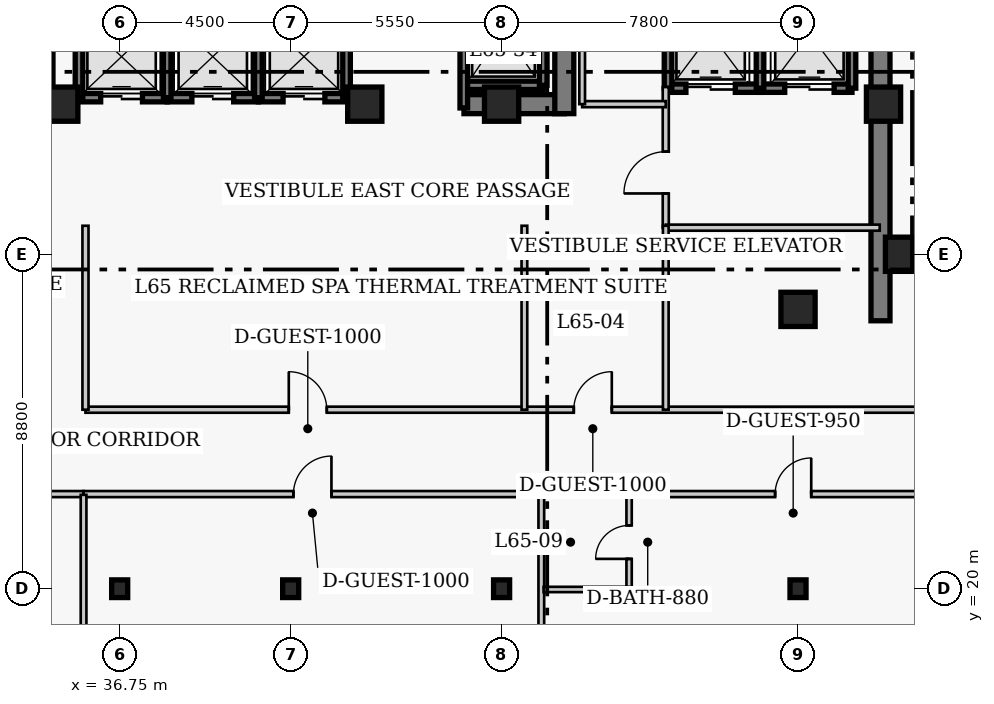
"""IFC4 building model, lengths in metres.
Left out: names, types, materials, properties, quantities, classifications, styles, units other than length and angle.
Written with IfcOpenShell. Run it as: python <this file> out.ifc"""

import sys

from ifc_helpers import new_model, si_unit, direction, frame, frame_2d, origin, origin_2d, place, context, subcontext, project, spatial, rectangle, i_section, extrude, element, fill, save


model = new_model("IFC4")
c1 = context("Model", 3, precision=1e-05, world=origin(), true_north=direction((0.0, 1.0)))
c2 = subcontext(c1, "Body", "Model", "MODEL_VIEW")
j1 = project(units=[si_unit("LENGTHUNIT", "METRE"), si_unit("PLANEANGLEUNIT", "RADIAN")], contexts=[c1])
p1 = place(None, origin())
s1 = spatial("IfcSite", under=j1, at=p1, CompositionType="ELEMENT")
p2 = place(p1, origin())
s2 = spatial("IfcBuilding", under=s1, at=p2, CompositionType="ELEMENT")
p3 = place(p2, frame((0.0, 0.0, 261.4)))
s3 = spatial("IfcBuildingStorey", under=s2, at=p3, CompositionType="ELEMENT", Elevation=261.4)
p4 = place(p3, frame((56.77, 27.05, 0.0), z_axis=(0.0, 0.0, 1.0), x_axis=(0.0, 1.0, 0.0)))
e1 = element("IfcWall", 1, at=p4, inside=s3, PredefinedType="SHEAR", context=c2, shape_type="SweptSolid", body=[
    extrude(rectangle(XDim=13.52, YDim=0.5, at=frame_2d((6.76, 0.0))), origin(), (0.0, 0.0, 1.0), 4.0),
])
p5 = place(p3, frame((45.81, 32.75, 0.0), z_axis=(0.0, 0.0, 1.0), x_axis=(1.0, 0.0, 0.0)))
e2 = element("IfcWall", 2, at=p5, inside=s3, PredefinedType="SHEAR", context=c2, shape_type="SweptSolid", body=[
    extrude(rectangle(XDim=2.64, YDim=0.5, at=frame_2d((1.32, 0.0))), origin(), (0.0, 0.0, 1.0), 4.0),
])
p6 = place(p3, frame((48.45, 32.5, 0.0), z_axis=(0.0, 0.0, 1.0), x_axis=(0.0, 1.0, 0.0)))
e3 = element("IfcWall", 3, at=p6, inside=s3, PredefinedType="SHEAR", context=c2, shape_type="SweptSolid", body=[
    extrude(rectangle(XDim=7.82, YDim=0.5, at=frame_2d((3.91, 0.0))), origin(), (0.0, 0.0, 1.0), 4.0),
])
p7 = place(p6, frame((5.7, 0.0, 0.0)))
e4 = element("IfcOpeningElement", 4, at=p7, cuts=e3, PredefinedType="OPENING", context=c2, shape_type="SweptSolid", body=[
    extrude(rectangle(XDim=1.1, YDim=2.15, at=frame_2d((0.55, 1.075))), frame((0.0, 0.26, 0.0), z_axis=(0.0, -1.0, 0.0), x_axis=(1.0, 0.0, 0.0)), (0.0, 0.0, 1.0), 0.52),
])
for number, where, z_axis, x_axis in (
    (5, (36.75, 20.0, 0.0), (0.0, 0.0, 1.0), (1.0, 0.0, 0.0)),
    (6, (41.25, 20.0, 0.0), (0.0, 0.0, 1.0), (1.0, 0.0, 0.0)),
    (7, (46.8, 20.0, 0.0), (0.0, 0.0, 1.0), (1.0, 0.0, 0.0)),
    (8, (54.6, 20.0, 0.0), (0.0, 0.0, 1.0), (1.0, 0.0, 0.0)),
):
    element("IfcColumn", number, at=place(p3, frame(where, z_axis=z_axis, x_axis=x_axis)), inside=s3, PredefinedType="COLUMN", context=c2, shape_type="SweptSolid", body=[
        extrude(i_section(OverallWidth=0.422, OverallDepth=0.465, WebThickness=0.045, FlangeThickness=0.073, FilletRadius=0.017, at=origin_2d()), origin(), (0.0, 0.0, 1.0), 4.0),
    ])
for number, where, z_axis, x_axis in (
    (9, (57.35, 28.8, 0.0), (0.0, 0.0, 1.0), (1.0, 0.0, 0.0)),
    (10, (35.2, 32.75, 0.0), (0.0, 0.0, 1.0), (1.0, 0.0, 0.0)),
    (11, (43.2, 32.75, 0.0), (0.0, 0.0, 1.0), (1.0, 0.0, 0.0)),
    (12, (46.8, 32.75, 0.0), (0.0, 0.0, 1.0), (1.0, 0.0, 0.0)),
    (13, (54.6, 27.35, 0.0), (0.0, 0.0, 1.0), (1.0, 0.0, 0.0)),
    (14, (56.85, 32.75, 0.0), (0.0, 0.0, 1.0), (1.0, 0.0, 0.0)),
):
    element("IfcColumn", number, at=place(p3, frame(where, z_axis=z_axis, x_axis=x_axis)), inside=s3, PredefinedType="COLUMN", context=c2, shape_type="SweptSolid", body=[
        extrude(rectangle(XDim=0.9, YDim=0.9, at=origin_2d()), origin(), (0.0, 0.0, 1.0), 4.0),
    ])
p8 = place(p3, frame((35.68, 32.92, 0.0), z_axis=(0.0, 0.0, 1.0), x_axis=(1.0, 0.0, 0.0)))
e15 = element("IfcWall", 15, at=p8, inside=s3, PredefinedType="SHEAR", context=c2, shape_type="SweptSolid", body=[
    extrude(rectangle(XDim=2.32, YDim=0.22, at=frame_2d((1.16, 0.0))), origin(), (0.0, 0.0, 1.0), 4.0),
])
p9 = place(p8, frame((0.57, 0.0, 0.0)))
e16 = element("IfcOpeningElement", 16, at=p9, cuts=e15, PredefinedType="OPENING", context=c2, shape_type="SweptSolid", body=[
    extrude(rectangle(XDim=1.1, YDim=2.15, at=frame_2d((0.55, 1.075))), frame((0.0, 0.12, 0.0), z_axis=(0.0, -1.0, 0.0), x_axis=(1.0, 0.0, 0.0)), (0.0, 0.0, 1.0), 0.24),
])
p10 = place(p3, frame((35.68, 32.92, 0.0), z_axis=(0.0, 0.0, 1.0), x_axis=(0.0, 1.0, 0.0)))
e17 = element("IfcWall", 17, at=p10, inside=s3, PredefinedType="SHEAR", context=c2, shape_type="SweptSolid", body=[
    extrude(rectangle(XDim=2.16, YDim=0.2, at=frame_2d((1.08, 0.0))), origin(), (0.0, 0.0, 1.0), 4.0),
])
p11 = place(p3, frame((38.0, 32.92, 0.0), z_axis=(0.0, 0.0, 1.0), x_axis=(1.0, 0.0, 0.0)))
e18 = element("IfcWall", 18, at=p11, inside=s3, PredefinedType="SHEAR", context=c2, shape_type="SweptSolid", body=[
    extrude(rectangle(XDim=2.4, YDim=0.22, at=frame_2d((1.2, 0.0))), origin(), (0.0, 0.0, 1.0), 4.0),
])
p12 = place(p11, frame((0.65, 0.0, 0.0)))
e19 = element("IfcOpeningElement", 19, at=p12, cuts=e18, PredefinedType="OPENING", context=c2, shape_type="SweptSolid", body=[
    extrude(rectangle(XDim=1.1, YDim=2.15, at=frame_2d((0.55, 1.075))), frame((0.0, 0.12, 0.0), z_axis=(0.0, -1.0, 0.0), x_axis=(1.0, 0.0, 0.0)), (0.0, 0.0, 1.0), 0.24),
])
p13 = place(p3, frame((38.0, 32.92, 0.0), z_axis=(0.0, 0.0, 1.0), x_axis=(0.0, 1.0, 0.0)))
e20 = element("IfcWall", 20, at=p13, inside=s3, PredefinedType="SHEAR", context=c2, shape_type="SweptSolid", body=[
    extrude(rectangle(XDim=2.16, YDim=0.2, at=frame_2d((1.08, 0.0))), origin(), (0.0, 0.0, 1.0), 4.0),
])
p14 = place(p3, frame((40.4, 32.92, 0.0), z_axis=(0.0, 0.0, 1.0), x_axis=(1.0, 0.0, 0.0)))
e21 = element("IfcWall", 21, at=p14, inside=s3, PredefinedType="SHEAR", context=c2, shape_type="SweptSolid", body=[
    extrude(rectangle(XDim=2.32, YDim=0.22, at=frame_2d((1.16, 0.0))), origin(), (0.0, 0.0, 1.0), 4.0),
])
p15 = place(p14, frame((0.65, 0.0, 0.0)))
e22 = element("IfcOpeningElement", 22, at=p15, cuts=e21, PredefinedType="OPENING", context=c2, shape_type="SweptSolid", body=[
    extrude(rectangle(XDim=1.1, YDim=2.15, at=frame_2d((0.55, 1.075))), frame((0.0, 0.12, 0.0), z_axis=(0.0, -1.0, 0.0), x_axis=(1.0, 0.0, 0.0)), (0.0, 0.0, 1.0), 0.24),
])
for number, where, z_axis, x_axis in (
    (23, (40.4, 32.92, 0.0), (0.0, 0.0, 1.0), (0.0, 1.0, 0.0)),
    (24, (42.72, 32.92, 0.0), (0.0, 0.0, 1.0), (0.0, 1.0, 0.0)),
):
    element("IfcWall", number, at=place(p3, frame(where, z_axis=z_axis, x_axis=x_axis)), inside=s3, PredefinedType="SHEAR", context=c2, shape_type="SweptSolid", body=[
        extrude(rectangle(XDim=2.16, YDim=0.2, at=frame_2d((1.08, 0.0))), origin(), (0.0, 0.0, 1.0), 4.0),
    ])
p16 = place(p3, frame((51.18, 33.17, 0.0), z_axis=(0.0, 0.0, 1.0), x_axis=(1.0, 0.0, 0.0)))
e25 = element("IfcWall", 25, at=p16, inside=s3, PredefinedType="SHEAR", context=c2, shape_type="SweptSolid", body=[
    extrude(rectangle(XDim=2.42, YDim=0.22, at=frame_2d((1.21, 0.0))), origin(), (0.0, 0.0, 1.0), 4.0),
])
p17 = place(p16, frame((0.47, 0.0, 0.0)))
e26 = element("IfcOpeningElement", 26, at=p17, cuts=e25, PredefinedType="OPENING", context=c2, shape_type="SweptSolid", body=[
    extrude(rectangle(XDim=1.3, YDim=2.15, at=frame_2d((0.65, 1.075))), frame((0.0, 0.12, 0.0), z_axis=(0.0, -1.0, 0.0), x_axis=(1.0, 0.0, 0.0)), (0.0, 0.0, 1.0), 0.24),
])
p18 = place(p3, frame((51.18, 33.17, 0.0), z_axis=(0.0, 0.0, 1.0), x_axis=(0.0, 1.0, 0.0)))
e27 = element("IfcWall", 27, at=p18, inside=s3, PredefinedType="SHEAR", context=c2, shape_type="SweptSolid", body=[
    extrude(rectangle(XDim=2.86, YDim=0.2, at=frame_2d((1.43, 0.0))), origin(), (0.0, 0.0, 1.0), 4.0),
])
p19 = place(p3, frame((53.6, 33.17, 0.0), z_axis=(0.0, 0.0, 1.0), x_axis=(1.0, 0.0, 0.0)))
e28 = element("IfcWall", 28, at=p19, inside=s3, PredefinedType="SHEAR", context=c2, shape_type="SweptSolid", body=[
    extrude(rectangle(XDim=2.42, YDim=0.22, at=frame_2d((1.21, 0.0))), origin(), (0.0, 0.0, 1.0), 4.0),
])
p20 = place(p19, frame((0.65, 0.0, 0.0)))
e29 = element("IfcOpeningElement", 29, at=p20, cuts=e28, PredefinedType="OPENING", context=c2, shape_type="SweptSolid", body=[
    extrude(rectangle(XDim=1.3, YDim=2.15, at=frame_2d((0.65, 1.075))), frame((0.0, 0.12, 0.0), z_axis=(0.0, -1.0, 0.0), x_axis=(1.0, 0.0, 0.0)), (0.0, 0.0, 1.0), 0.24),
])
for number, where, z_axis, x_axis in (
    (30, (53.6, 33.17, 0.0), (0.0, 0.0, 1.0), (0.0, 1.0, 0.0)),
    (31, (56.02, 33.17, 0.0), (0.0, 0.0, 1.0), (0.0, 1.0, 0.0)),
):
    element("IfcWall", number, at=place(p3, frame(where, z_axis=z_axis, x_axis=x_axis)), inside=s3, PredefinedType="SHEAR", context=c2, shape_type="SweptSolid", body=[
        extrude(rectangle(XDim=2.86, YDim=0.2, at=frame_2d((1.43, 0.0))), origin(), (0.0, 0.0, 1.0), 4.0),
    ])
p21 = place(p3, frame((34.895, 33.245, 0.0), z_axis=(0.0, 0.0, 1.0), x_axis=(0.0, 1.0, 0.0)))
e32 = element("IfcWall", 32, at=p21, inside=s3, PredefinedType="SHEAR", context=c2, shape_type="SweptSolid", body=[
    extrude(rectangle(XDim=2.91, YDim=0.2, at=frame_2d((1.455, 0.0))), origin(), (0.0, 0.0, 1.0), 4.0),
])
p22 = place(p3, frame((45.805, 33.245, 0.0), z_axis=(0.0, 0.0, 1.0), x_axis=(1.0, 0.0, 0.0)))
e33 = element("IfcWall", 33, at=p22, inside=s3, PredefinedType="SHEAR", context=c2, shape_type="SweptSolid", body=[
    extrude(rectangle(XDim=2.09, YDim=0.22, at=frame_2d((1.045, 0.0))), origin(), (0.0, 0.0, 1.0), 4.0),
])
p23 = place(p3, frame((45.805, 32.65, 0.0), z_axis=(0.0, 0.0, 1.0), x_axis=(0.0, 1.0, 0.0)))
e34 = element("IfcWall", 34, at=p23, inside=s3, PredefinedType="SHEAR", context=c2, shape_type="SweptSolid", body=[
    extrude(rectangle(XDim=3.505, YDim=0.2, at=frame_2d((1.752, 0.0))), origin(), (0.0, 0.0, 1.0), 4.0),
])
p24 = place(p3, frame((47.895, 33.245, 0.0), z_axis=(0.0, 0.0, 1.0), x_axis=(0.0, 1.0, 0.0)))
e35 = element("IfcWall", 35, at=p24, inside=s3, PredefinedType="SHEAR", context=c2, shape_type="SweptSolid", body=[
    extrude(rectangle(XDim=2.91, YDim=0.2, at=frame_2d((1.455, 0.0))), origin(), (0.0, 0.0, 1.0), 4.0),
])
p25 = place(p3, frame((51.12, 29.5, 0.0), z_axis=(0.0, 0.0, 1.0), x_axis=(0.0, 1.0, 0.0)))
e36 = element("IfcWall", 36, at=p25, inside=s3, PredefinedType="PARTITIONING", context=c2, shape_type="SweptSolid", body=[
    extrude(rectangle(XDim=3.7, YDim=0.16, at=frame_2d((1.85, 0.0))), origin(), (0.0, 0.0, 1.0), 3.76),
])
p26 = place(p25, frame((0.9, 0.0, 0.0)))
e37 = element("IfcOpeningElement", 37, at=p26, cuts=e36, PredefinedType="OPENING", context=c2, shape_type="SweptSolid", body=[
    extrude(rectangle(XDim=1.1, YDim=2.15, at=frame_2d((0.55, 1.075))), frame((0.0, 0.09, 0.0), z_axis=(0.0, -1.0, 0.0), x_axis=(1.0, 0.0, 0.0)), (0.0, 0.0, 1.0), 0.18),
])
p27 = place(p3, frame((51.12, 29.5, 0.0), z_axis=(0.0, 0.0, 1.0), x_axis=(1.0, 0.0, 0.0)))
e38 = element("IfcWall", 38, at=p27, inside=s3, PredefinedType="PARTITIONING", context=c2, shape_type="SweptSolid", body=[
    extrude(rectangle(XDim=5.63, YDim=0.16, at=frame_2d((2.815, 0.0))), origin(), (0.0, 0.0, 1.0), 3.76),
])
p28 = place(p3, frame((48.92, 32.75, 0.0), z_axis=(0.0, 0.0, 1.0), x_axis=(1.0, 0.0, 0.0)))
e39 = element("IfcWall", 39, at=p28, inside=s3, PredefinedType="PARTITIONING", context=c2, shape_type="SweptSolid", body=[
    extrude(rectangle(XDim=2.2, YDim=0.16, at=frame_2d((1.1, 0.0))), origin(), (0.0, 0.0, 1.0), 3.76),
])
p29 = place(p3, frame((48.92, 32.75, 0.0), z_axis=(0.0, 0.0, 1.0), x_axis=(0.0, 1.0, 0.0)))
e40 = element("IfcWall", 40, at=p29, inside=s3, PredefinedType="PARTITIONING", context=c2, shape_type="SweptSolid", body=[
    extrude(rectangle(XDim=3.62, YDim=0.15, at=frame_2d((1.81, 0.0))), origin(), (0.0, 0.0, 1.0), 3.76),
])
p30 = place(p3, frame((35.85, 24.71, 0.0), z_axis=(0.0, 0.0, 1.0), x_axis=(1.0, 0.0, 0.0)))
e41 = element("IfcWall", 41, at=p30, inside=s3, PredefinedType="PARTITIONING", context=c2, shape_type="SweptSolid", body=[
    extrude(rectangle(XDim=23.0, YDim=0.16, at=frame_2d((11.5, 0.0))), origin(), (0.0, 0.0, 1.0), 3.76),
])
p31 = place(p30, frame((5.35, 0.0, 0.0)))
e42 = element("IfcOpeningElement", 42, at=p31, cuts=e41, PredefinedType="OPENING", context=c2, shape_type="SweptSolid", body=[
    extrude(rectangle(XDim=1.0, YDim=2.15, at=frame_2d((0.5, 1.075))), frame((0.0, 0.09, 0.0), z_axis=(0.0, -1.0, 0.0), x_axis=(1.0, 0.0, 0.0)), (0.0, 0.0, 1.0), 0.18),
])
p32 = place(p30, frame((12.85, 0.0, 0.0)))
e43 = element("IfcOpeningElement", 43, at=p32, cuts=e41, PredefinedType="OPENING", context=c2, shape_type="SweptSolid", body=[
    extrude(rectangle(XDim=1.0, YDim=2.15, at=frame_2d((0.5, 1.075))), frame((0.0, 0.09, 0.0), z_axis=(0.0, -1.0, 0.0), x_axis=(1.0, 0.0, 0.0)), (0.0, 0.0, 1.0), 0.18),
])
p33 = place(p3, frame((35.85, 24.71, 0.0), z_axis=(0.0, 0.0, 1.0), x_axis=(0.0, 1.0, 0.0)))
e44 = element("IfcWall", 44, at=p33, inside=s3, PredefinedType="PARTITIONING", context=c2, shape_type="SweptSolid", body=[
    extrude(rectangle(XDim=4.84, YDim=0.16, at=frame_2d((2.42, 0.0))), origin(), (0.0, 0.0, 1.0), 3.76),
])
p34 = place(p3, frame((19.1, 22.49, 0.0), z_axis=(0.0, 0.0, 1.0), x_axis=(1.0, 0.0, 0.0)))
e45 = element("IfcWall", 45, at=p34, inside=s3, PredefinedType="PARTITIONING", context=c2, shape_type="SweptSolid", body=[
    extrude(rectangle(XDim=16.7, YDim=0.16, at=frame_2d((8.35, 0.0))), origin(), (0.0, 0.0, 1.0), 3.76),
])
p35 = place(p34, frame((7.88, 0.0, 0.0)))
e46 = element("IfcOpeningElement", 46, at=p35, cuts=e45, PredefinedType="OPENING", context=c2, shape_type="SweptSolid", body=[
    extrude(rectangle(XDim=1.0, YDim=2.15, at=frame_2d((0.5, 1.075))), frame((0.0, 0.09, 0.0), z_axis=(0.0, -1.0, 0.0), x_axis=(1.0, 0.0, 0.0)), (0.0, 0.0, 1.0), 0.18),
])
p36 = place(p3, frame((35.8, 22.49, 0.0), z_axis=(0.0, 0.0, 1.0), x_axis=(1.0, 0.0, 0.0)))
e47 = element("IfcWall", 47, at=p36, inside=s3, PredefinedType="PARTITIONING", context=c2, shape_type="SweptSolid", body=[
    extrude(rectangle(XDim=25.21, YDim=0.16, at=frame_2d((12.605, 0.0))), origin(), (0.0, 0.0, 1.0), 3.76),
])
p37 = place(p36, frame((5.522, 0.0, 0.0)))
e48 = element("IfcOpeningElement", 48, at=p37, cuts=e47, PredefinedType="OPENING", context=c2, shape_type="SweptSolid", body=[
    extrude(rectangle(XDim=1.0, YDim=2.15, at=frame_2d((0.5, 1.075))), frame((0.0, 0.09, 0.0), z_axis=(0.0, -1.0, 0.0), x_axis=(1.0, 0.0, 0.0)), (0.0, 0.0, 1.0), 0.18),
])
p38 = place(p36, frame((18.198, 0.0, 0.0)))
e49 = element("IfcOpeningElement", 49, at=p38, cuts=e47, PredefinedType="OPENING", context=c2, shape_type="SweptSolid", body=[
    extrude(rectangle(XDim=0.95, YDim=2.1, at=frame_2d((0.475, 1.05))), frame((0.0, 0.09, 0.0), z_axis=(0.0, -1.0, 0.0), x_axis=(1.0, 0.0, 0.0)), (0.0, 0.0, 1.0), 0.18),
])
p39 = place(p36, frame((23.665, 0.0, 0.0)))
e50 = element("IfcOpeningElement", 50, at=p39, cuts=e47, PredefinedType="OPENING", context=c2, shape_type="SweptSolid", body=[
    extrude(rectangle(XDim=0.95, YDim=2.1, at=frame_2d((0.475, 1.05))), frame((0.0, 0.09, 0.0), z_axis=(0.0, -1.0, 0.0), x_axis=(1.0, 0.0, 0.0)), (0.0, 0.0, 1.0), 0.18),
])
for number, where, z_axis, x_axis in (
    (51, (47.4, 24.71, 0.0), (0.0, 0.0, 1.0), (0.0, 1.0, 0.0)),
    (52, (51.12, 24.71, 0.0), (0.0, 0.0, 1.0), (0.0, 1.0, 0.0)),
):
    element("IfcWall", number, at=place(p3, frame(where, z_axis=z_axis, x_axis=x_axis)), inside=s3, PredefinedType="PARTITIONING", context=c2, shape_type="SweptSolid", body=[
        extrude(rectangle(XDim=4.84, YDim=0.15, at=frame_2d((2.42, 0.0))), origin(), (0.0, 0.0, 1.0), 3.76),
    ])
p40 = place(p3, frame((35.8, 6.52, 0.0), z_axis=(0.0, 0.0, 1.0), x_axis=(0.0, 1.0, 0.0)))
e53 = element("IfcWall", 53, at=p40, inside=s3, PredefinedType="PARTITIONING", context=c2, shape_type="SweptSolid", body=[
    extrude(rectangle(XDim=15.95, YDim=0.15, at=frame_2d((7.975, 0.0))), origin(), (0.0, 0.0, 1.0), 3.76),
])
p41 = place(p3, frame((47.845, 9.72, 0.0), z_axis=(0.0, 0.0, 1.0), x_axis=(0.0, 1.0, 0.0)))
e54 = element("IfcWall", 54, at=p41, inside=s3, PredefinedType="PARTITIONING", context=c2, shape_type="SweptSolid", body=[
    extrude(rectangle(XDim=12.77, YDim=0.15, at=frame_2d((6.385, 0.0))), origin(), (0.0, 0.0, 1.0), 3.76),
])
p42 = place(p3, frame((50.155, 19.98, 0.0), z_axis=(0.0, 0.0, 1.0), x_axis=(0.0, 1.0, 0.0)))
e55 = element("IfcWall", 55, at=p42, inside=s3, PredefinedType="PLUMBINGWALL", context=c2, shape_type="SweptSolid", body=[
    extrude(rectangle(XDim=2.49, YDim=0.14, at=frame_2d((1.245, 0.0))), origin(), (0.0, 0.0, 1.0), 3.76),
])
p43 = place(p42, frame((0.805, 0.0, 0.0)))
e56 = element("IfcOpeningElement", 56, at=p43, cuts=e55, PredefinedType="OPENING", context=c2, shape_type="SweptSolid", body=[
    extrude(rectangle(XDim=0.88, YDim=2.05, at=frame_2d((0.44, 1.025))), frame((0.0, 0.08, 0.0), z_axis=(0.0, -1.0, 0.0), x_axis=(1.0, 0.0, 0.0)), (0.0, 0.0, 1.0), 0.16),
])
p44 = place(p3, frame((47.905, 19.98, 0.0), z_axis=(0.0, 0.0, 1.0), x_axis=(1.0, 0.0, 0.0)))
e57 = element("IfcWall", 57, at=p44, inside=s3, PredefinedType="PLUMBINGWALL", context=c2, shape_type="SweptSolid", body=[
    extrude(rectangle(XDim=2.25, YDim=0.14, at=frame_2d((1.125, 0.0))), origin(), (0.0, 0.0, 1.0), 3.064),
])
p45 = place(p9, origin())
e58 = element("IfcDoor", 58, at=p45, inside=s3, OperationType="DOUBLE_DOOR_SLIDING", PredefinedType="DOOR", context=c2, shape_type="SweptSolid", body=[
    extrude(rectangle(XDim=1.1, YDim=2.15, at=frame_2d((0.55, 1.075))), frame((0.0, 0.025, 0.0), z_axis=(0.0, -1.0, 0.0), x_axis=(1.0, 0.0, 0.0)), (0.0, 0.0, 1.0), 0.05),
])
fill(e16, e58)
p46 = place(p12, origin())
e59 = element("IfcDoor", 59, at=p46, inside=s3, OperationType="DOUBLE_DOOR_SLIDING", PredefinedType="DOOR", context=c2, shape_type="SweptSolid", body=[
    extrude(rectangle(XDim=1.1, YDim=2.15, at=frame_2d((0.55, 1.075))), frame((0.0, 0.025, 0.0), z_axis=(0.0, -1.0, 0.0), x_axis=(1.0, 0.0, 0.0)), (0.0, 0.0, 1.0), 0.05),
])
fill(e19, e59)
p47 = place(p15, origin())
e60 = element("IfcDoor", 60, at=p47, inside=s3, OperationType="DOUBLE_DOOR_SLIDING", PredefinedType="DOOR", context=c2, shape_type="SweptSolid", body=[
    extrude(rectangle(XDim=1.1, YDim=2.15, at=frame_2d((0.55, 1.075))), frame((0.0, 0.025, 0.0), z_axis=(0.0, -1.0, 0.0), x_axis=(1.0, 0.0, 0.0)), (0.0, 0.0, 1.0), 0.05),
])
fill(e22, e60)
p48 = place(p17, origin())
e61 = element("IfcDoor", 61, at=p48, inside=s3, OperationType="DOUBLE_DOOR_SLIDING", PredefinedType="DOOR", context=c2, shape_type="SweptSolid", body=[
    extrude(rectangle(XDim=1.3, YDim=2.15, at=frame_2d((0.65, 1.075))), frame((0.0, 0.025, 0.0), z_axis=(0.0, -1.0, 0.0), x_axis=(1.0, 0.0, 0.0)), (0.0, 0.0, 1.0), 0.05),
])
fill(e26, e61)
p49 = place(p20, origin())
e62 = element("IfcDoor", 62, at=p49, inside=s3, OperationType="DOUBLE_DOOR_SLIDING", PredefinedType="DOOR", context=c2, shape_type="SweptSolid", body=[
    extrude(rectangle(XDim=1.3, YDim=2.15, at=frame_2d((0.65, 1.075))), frame((0.0, 0.025, 0.0), z_axis=(0.0, -1.0, 0.0), x_axis=(1.0, 0.0, 0.0)), (0.0, 0.0, 1.0), 0.05),
])
fill(e29, e62)
p50 = place(p26, origin())
e63 = element("IfcDoor", 63, at=p50, inside=s3, OperationType="SINGLE_SWING_LEFT", PredefinedType="DOOR", context=c2, shape_type="SweptSolid", body=[
    extrude(rectangle(XDim=1.1, YDim=2.15, at=frame_2d((0.55, 1.075))), frame((0.0, 0.025, 0.0), z_axis=(0.0, -1.0, 0.0), x_axis=(1.0, 0.0, 0.0)), (0.0, 0.0, 1.0), 0.05),
])
fill(e37, e63)
p51 = place(p31, origin())
e64 = element("IfcDoor", 64, at=p51, inside=s3, OperationType="SINGLE_SWING_LEFT", PredefinedType="DOOR", context=c2, shape_type="SweptSolid", body=[
    extrude(rectangle(XDim=1.0, YDim=2.15, at=frame_2d((0.5, 1.075))), frame((0.0, 0.025, 0.0), z_axis=(0.0, -1.0, 0.0), x_axis=(1.0, 0.0, 0.0)), (0.0, 0.0, 1.0), 0.05),
])
fill(e42, e64)
p52 = place(p32, origin())
e65 = element("IfcDoor", 65, at=p52, inside=s3, OperationType="SINGLE_SWING_RIGHT", PredefinedType="DOOR", context=c2, shape_type="SweptSolid", body=[
    extrude(rectangle(XDim=1.0, YDim=2.15, at=frame_2d((0.5, 1.075))), frame((0.0, 0.025, 0.0), z_axis=(0.0, -1.0, 0.0), x_axis=(1.0, 0.0, 0.0)), (0.0, 0.0, 1.0), 0.05),
])
fill(e43, e65)
p53 = place(p37, origin())
e66 = element("IfcDoor", 66, at=p53, inside=s3, OperationType="SINGLE_SWING_RIGHT", PredefinedType="DOOR", context=c2, shape_type="SweptSolid", body=[
    extrude(rectangle(XDim=1.0, YDim=2.15, at=frame_2d((0.5, 1.075))), frame((0.0, 0.025, 0.0), z_axis=(0.0, -1.0, 0.0), x_axis=(1.0, 0.0, 0.0)), (0.0, 0.0, 1.0), 0.05),
])
fill(e48, e66)
p54 = place(p43, origin())
e67 = element("IfcDoor", 67, at=p54, inside=s3, OperationType="SINGLE_SWING_LEFT", PredefinedType="DOOR", context=c2, shape_type="SweptSolid", body=[
    extrude(rectangle(XDim=0.88, YDim=2.05, at=frame_2d((0.44, 1.025))), frame((0.0, 0.025, 0.0), z_axis=(0.0, -1.0, 0.0), x_axis=(1.0, 0.0, 0.0)), (0.0, 0.0, 1.0), 0.05),
])
fill(e56, e67)
p55 = place(p38, origin())
e68 = element("IfcDoor", 68, at=p55, inside=s3, OperationType="SINGLE_SWING_RIGHT", PredefinedType="DOOR", context=c2, shape_type="SweptSolid", body=[
    extrude(rectangle(XDim=0.95, YDim=2.1, at=frame_2d((0.475, 1.05))), frame((0.0, 0.025, 0.0), z_axis=(0.0, -1.0, 0.0), x_axis=(1.0, 0.0, 0.0)), (0.0, 0.0, 1.0), 0.05),
])
fill(e49, e68)
save(model, sys.argv[1])
